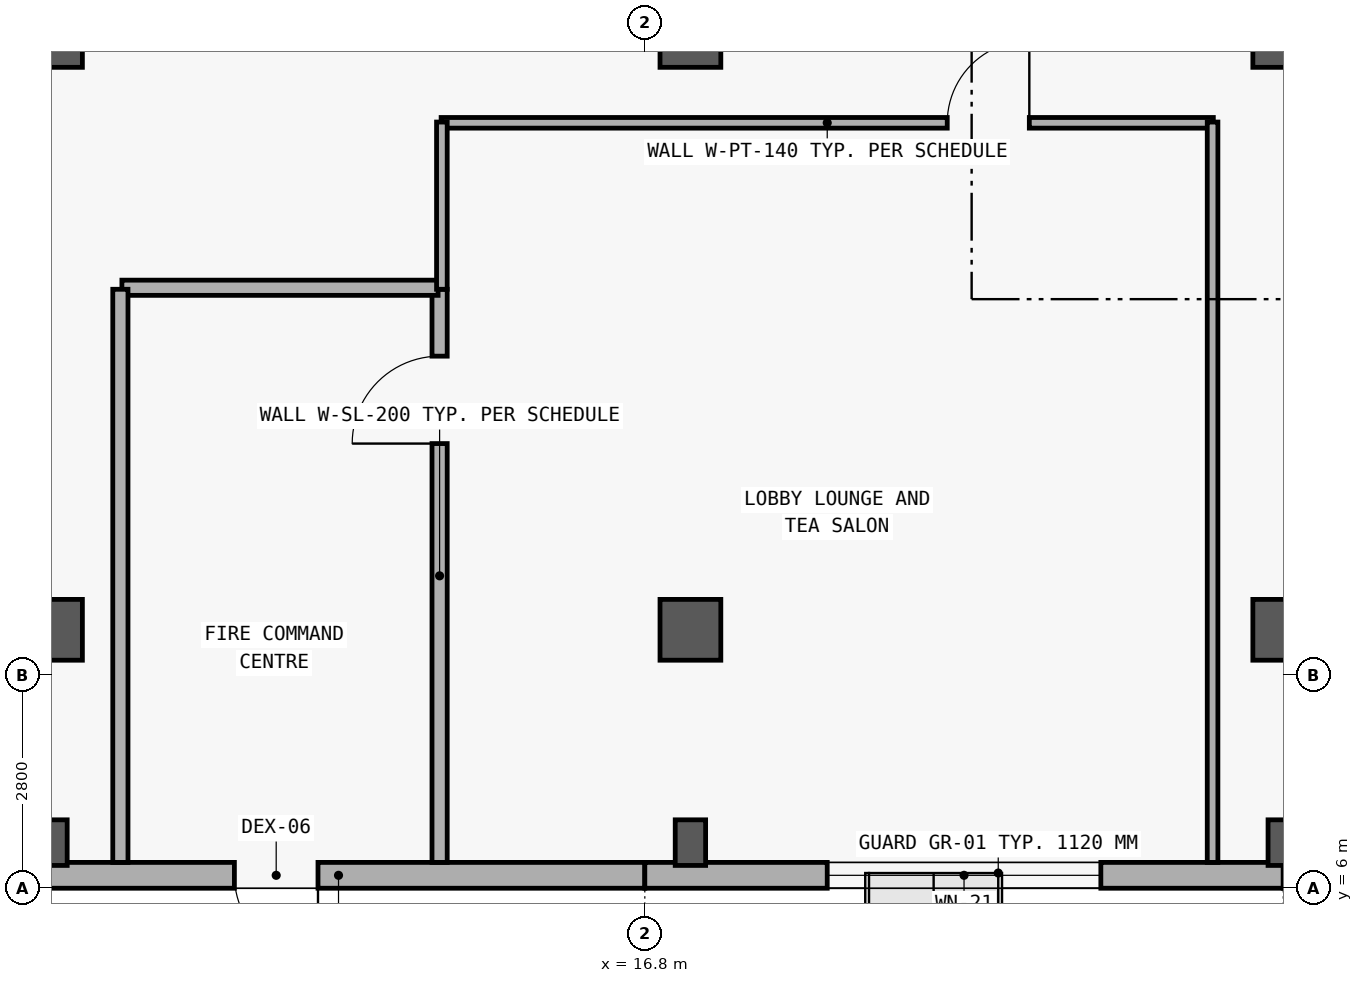
"""IFC4 building model, lengths in metres.
Left out: names, types, materials, properties, quantities, classifications, styles, units other than length and angle.
Written with IfcOpenShell. Run it as: python <this file> out.ifc"""

import sys

from ifc_helpers import new_model, si_unit, direction, frame, frame_2d, origin, origin_2d, place, context, subcontext, project, spatial, rectangle, extrude, element, fill, save


model = new_model("IFC4")
c1 = context("Model", 3, precision=1e-05, world=origin(), true_north=direction((0.0, 1.0)))
c2 = subcontext(c1, "Body", "Model", "MODEL_VIEW")
j1 = project(units=[si_unit("LENGTHUNIT", "METRE"), si_unit("PLANEANGLEUNIT", "RADIAN")], contexts=[c1])
p1 = place(None, origin())
s1 = spatial("IfcSite", under=j1, at=p1, CompositionType="ELEMENT")
p2 = place(p1, origin())
s2 = spatial("IfcBuilding", under=s1, at=p2, CompositionType="ELEMENT")
p3 = place(p2, origin())
s3 = spatial("IfcBuildingStorey", under=s2, at=p3, CompositionType="ELEMENT", Elevation=0.0)
p4 = place(p3, frame((9.0, 6.6, 0.0), z_axis=(0.0, 0.0, 1.0), x_axis=(1.0, 0.0, 0.0)))
e1 = element("IfcColumn", 1, at=p4, inside=s3, PredefinedType="PILASTER", context=c2, shape_type="SweptSolid", body=[
    extrude(rectangle(XDim=0.4, YDim=0.6, at=origin_2d()), origin(), (0.0, 0.0, 1.0), 5.4),
])
for number, where, z_axis, x_axis in (
    (2, (9.0, 9.4, 0.0), (0.0, 0.0, 1.0), (1.0, 0.0, 0.0)),
    (3, (9.0, 17.2, 0.0), (0.0, 0.0, 1.0), (1.0, 0.0, 0.0)),
):
    element("IfcColumn", number, at=place(p3, frame(where, z_axis=z_axis, x_axis=x_axis)), inside=s3, PredefinedType="COLUMN", context=c2, shape_type="SweptSolid", body=[
        extrude(rectangle(XDim=0.8, YDim=0.8, at=origin_2d()), origin(), (0.0, 0.0, 1.0), 5.4),
    ])
p5 = place(p3, frame((17.4, 6.6, 0.0), z_axis=(0.0, 0.0, 1.0), x_axis=(1.0, 0.0, 0.0)))
e4 = element("IfcColumn", 4, at=p5, inside=s3, PredefinedType="PILASTER", context=c2, shape_type="SweptSolid", body=[
    extrude(rectangle(XDim=0.4, YDim=0.6, at=origin_2d()), origin(), (0.0, 0.0, 1.0), 5.4),
])
for number, where, z_axis, x_axis in (
    (5, (17.4, 9.4, 0.0), (0.0, 0.0, 1.0), (1.0, 0.0, 0.0)),
    (6, (17.4, 17.2, 0.0), (0.0, 0.0, 1.0), (1.0, 0.0, 0.0)),
):
    element("IfcColumn", number, at=place(p3, frame(where, z_axis=z_axis, x_axis=x_axis)), inside=s3, PredefinedType="COLUMN", context=c2, shape_type="SweptSolid", body=[
        extrude(rectangle(XDim=0.8, YDim=0.8, at=origin_2d()), origin(), (0.0, 0.0, 1.0), 5.4),
    ])
p6 = place(p3, frame((25.2, 6.6, 0.0), z_axis=(0.0, 0.0, 1.0), x_axis=(1.0, 0.0, 0.0)))
e7 = element("IfcColumn", 7, at=p6, inside=s3, PredefinedType="PILASTER", context=c2, shape_type="SweptSolid", body=[
    extrude(rectangle(XDim=0.4, YDim=0.6, at=origin_2d()), origin(), (0.0, 0.0, 1.0), 5.4),
])
for number, where, z_axis, x_axis in (
    (8, (25.2, 9.4, 0.0), (0.0, 0.0, 1.0), (1.0, 0.0, 0.0)),
    (9, (25.2, 17.2, 0.0), (0.0, 0.0, 1.0), (1.0, 0.0, 0.0)),
):
    element("IfcColumn", number, at=place(p3, frame(where, z_axis=z_axis, x_axis=x_axis)), inside=s3, PredefinedType="COLUMN", context=c2, shape_type="SweptSolid", body=[
        extrude(rectangle(XDim=0.8, YDim=0.8, at=origin_2d()), origin(), (0.0, 0.0, 1.0), 5.4),
    ])
p7 = place(p3, frame((16.8, 6.17, 0.0), z_axis=(0.0, 0.0, 1.0), x_axis=(-1.0, 0.0, 0.0)))
e10 = element("IfcWall", 10, at=p7, inside=s3, PredefinedType="SOLIDWALL", context=c2, shape_type="SweptSolid", body=[
    extrude(rectangle(XDim=8.06, YDim=0.34, at=frame_2d((4.03, 0.0))), origin(), (0.0, 0.0, 1.0), 5.1),
])
p8 = place(p7, frame((4.3, 0.0, 0.0)))
e11 = element("IfcOpeningElement", 11, at=p8, cuts=e10, PredefinedType="OPENING", context=c2, shape_type="SweptSolid", body=[
    extrude(rectangle(XDim=1.1, YDim=2.2, at=frame_2d((0.55, 1.1))), frame((0.0, 0.18, 0.0), z_axis=(0.0, -1.0, 0.0), x_axis=(1.0, 0.0, 0.0)), (0.0, 0.0, 1.0), 0.36),
])
p9 = place(p3, frame((25.2, 6.17, 0.0), z_axis=(0.0, 0.0, 1.0), x_axis=(-1.0, 0.0, 0.0)))
e12 = element("IfcWall", 12, at=p9, inside=s3, PredefinedType="SOLIDWALL", context=c2, shape_type="SweptSolid", body=[
    extrude(rectangle(XDim=8.4, YDim=0.34, at=frame_2d((4.2, 0.0))), origin(), (0.0, 0.0, 1.0), 5.1),
])
p10 = place(p9, frame((2.4, 0.0, 0.9)))
e13 = element("IfcOpeningElement", 13, at=p10, cuts=e12, PredefinedType="OPENING", context=c2, shape_type="SweptSolid", body=[
    extrude(rectangle(XDim=3.6, YDim=2.3, at=frame_2d((1.8, 1.15))), frame((0.0, 0.18, 0.0), z_axis=(0.0, -1.0, 0.0), x_axis=(1.0, 0.0, 0.0)), (0.0, 0.0, 1.0), 0.36),
])
p11 = place(p3, frame((33.6, 6.17, 0.0), z_axis=(0.0, 0.0, 1.0), x_axis=(-1.0, 0.0, 0.0)))
e14 = element("IfcWall", 14, at=p11, inside=s3, PredefinedType="SOLIDWALL", context=c2, shape_type="SweptSolid", body=[
    extrude(rectangle(XDim=8.4, YDim=0.34, at=frame_2d((4.2, 0.0))), origin(), (0.0, 0.0, 1.0), 5.1),
])
p12 = place(p11, frame((3.3, 0.0, 0.0)))
e15 = element("IfcOpeningElement", 15, at=p12, cuts=e14, PredefinedType="OPENING", context=c2, shape_type="SweptSolid", body=[
    extrude(rectangle(XDim=1.8, YDim=2.4, at=frame_2d((0.9, 1.2))), frame((0.0, 0.18, 0.0), z_axis=(0.0, -1.0, 0.0), x_axis=(1.0, 0.0, 0.0)), (0.0, 0.0, 1.0), 0.36),
])
p13 = place(p3, frame((14.1, 6.34, 0.0), z_axis=(0.0, 0.0, 1.0), x_axis=(0.0, 1.0, 0.0)))
e16 = element("IfcWall", 16, at=p13, inside=s3, PredefinedType="SOLIDWALL", context=c2, shape_type="SweptSolid", body=[
    extrude(rectangle(XDim=7.54, YDim=0.2, at=frame_2d((3.77, 0.0))), origin(), (0.0, 0.0, 1.0), 4.18),
])
p14 = place(p13, frame((5.51, 0.0, 0.0)))
e17 = element("IfcOpeningElement", 17, at=p14, cuts=e16, PredefinedType="OPENING", context=c2, shape_type="SweptSolid", body=[
    extrude(rectangle(XDim=1.15, YDim=2.2, at=frame_2d((0.575, 1.1))), frame((0.0, 0.11, 0.0), z_axis=(0.0, -1.0, 0.0), x_axis=(1.0, 0.0, 0.0)), (0.0, 0.0, 1.0), 0.22),
])
p15 = place(p3, frame((14.12, 16.07, 0.0), z_axis=(0.0, 0.0, 1.0), x_axis=(1.0, 0.0, 0.0)))
e18 = element("IfcWall", 18, at=p15, inside=s3, PredefinedType="PARTITIONING", context=c2, shape_type="SweptSolid", body=[
    extrude(rectangle(XDim=10.16, YDim=0.14, at=frame_2d((5.08, 0.0))), origin(), (0.0, 0.0, 1.0), 4.18),
])
p16 = place(p15, frame((6.659, 0.0, 0.0)))
e19 = element("IfcOpeningElement", 19, at=p16, cuts=e18, PredefinedType="OPENING", context=c2, shape_type="SweptSolid", body=[
    extrude(rectangle(XDim=1.08, YDim=2.25, at=frame_2d((0.54, 1.125))), frame((0.0, 0.08, 0.0), z_axis=(0.0, -1.0, 0.0), x_axis=(1.0, 0.0, 0.0)), (0.0, 0.0, 1.0), 0.16),
])
p17 = place(p3, frame((9.92, 13.9, 0.0), z_axis=(0.0, 0.0, 1.0), x_axis=(1.0, 0.0, 0.0)))
e20 = element("IfcWall", 20, at=p17, inside=s3, PredefinedType="SOLIDWALL", context=c2, shape_type="SweptSolid", body=[
    extrude(rectangle(XDim=4.16, YDim=0.2, at=frame_2d((2.08, 0.0))), origin(), (0.0, 0.0, 1.0), 4.18),
])
p18 = place(p3, frame((9.9, 6.34, 0.0), z_axis=(0.0, 0.0, 1.0), x_axis=(0.0, 1.0, 0.0)))
e21 = element("IfcWall", 21, at=p18, inside=s3, PredefinedType="SOLIDWALL", context=c2, shape_type="SweptSolid", body=[
    extrude(rectangle(XDim=7.54, YDim=0.2, at=frame_2d((3.77, 0.0))), origin(), (0.0, 0.0, 1.0), 4.18),
])
p19 = place(p3, frame((14.13, 13.88, 0.0), z_axis=(0.0, 0.0, 1.0), x_axis=(0.0, 1.0, 0.0)))
e22 = element("IfcWall", 22, at=p19, inside=s3, PredefinedType="PARTITIONING", context=c2, shape_type="SweptSolid", body=[
    extrude(rectangle(XDim=2.2, YDim=0.14, at=frame_2d((1.1, 0.0))), origin(), (0.0, 0.0, 1.0), 4.18),
])
p20 = place(p3, frame((24.27, 6.34, 0.0), z_axis=(0.0, 0.0, 1.0), x_axis=(0.0, 1.0, 0.0)))
e23 = element("IfcWall", 23, at=p20, inside=s3, PredefinedType="PARTITIONING", context=c2, shape_type="SweptSolid", body=[
    extrude(rectangle(XDim=9.74, YDim=0.14, at=frame_2d((4.87, 0.0))), origin(), (0.0, 0.0, 1.0), 4.18),
])
p21 = place(p8, origin())
e24 = element("IfcDoor", 24, at=p21, inside=s3, OperationType="SINGLE_SWING_LEFT", PredefinedType="DOOR", context=c2, shape_type="SweptSolid", body=[
    extrude(rectangle(XDim=1.1, YDim=2.2, at=frame_2d((0.55, 1.1))), frame((0.0, 0.025, 0.0), z_axis=(0.0, -1.0, 0.0), x_axis=(1.0, 0.0, 0.0)), (0.0, 0.0, 1.0), 0.05),
])
fill(e11, e24)
p22 = place(p10, origin())
e25 = element("IfcWindow", 25, at=p22, inside=s3, PartitioningType="SINGLE_PANEL", PredefinedType="WINDOW", context=c2, shape_type="SweptSolid", body=[
    extrude(rectangle(XDim=3.6, YDim=2.3, at=frame_2d((1.8, 1.15))), frame((0.0, 0.03, 0.0), z_axis=(0.0, -1.0, 0.0), x_axis=(1.0, 0.0, 0.0)), (0.0, 0.0, 1.0), 0.06),
])
fill(e13, e25)
p23 = place(p14, origin())
e26 = element("IfcDoor", 26, at=p23, inside=s3, OperationType="SINGLE_SWING_LEFT", PredefinedType="DOOR", context=c2, shape_type="SweptSolid", body=[
    extrude(rectangle(XDim=1.15, YDim=2.2, at=frame_2d((0.575, 1.1))), frame((0.0, 0.025, 0.0), z_axis=(0.0, -1.0, 0.0), x_axis=(1.0, 0.0, 0.0)), (0.0, 0.0, 1.0), 0.05),
])
fill(e17, e26)
p24 = place(p16, origin())
e27 = element("IfcDoor", 27, at=p24, inside=s3, OperationType="SINGLE_SWING_RIGHT", PredefinedType="DOOR", context=c2, shape_type="SweptSolid", body=[
    extrude(rectangle(XDim=1.08, YDim=2.25, at=frame_2d((0.54, 1.125))), frame((0.0, 0.025, 0.0), z_axis=(0.0, -1.0, 0.0), x_axis=(1.0, 0.0, 0.0)), (0.0, 0.0, 1.0), 0.05),
])
fill(e19, e27)
save(model, sys.argv[1])
